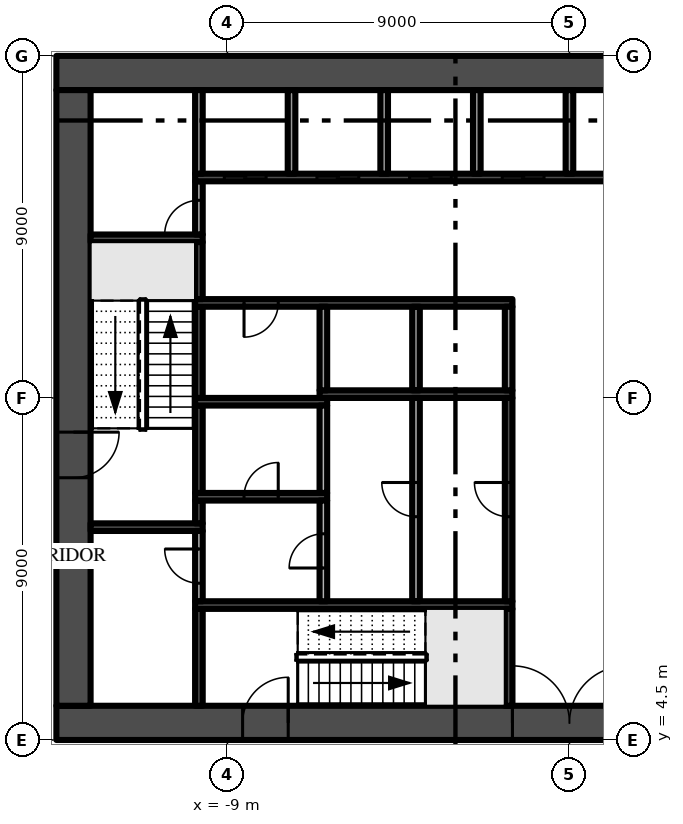
"""IFC4 building model, lengths in metres.
Left out: names, types, materials, properties, quantities, classifications, styles, units other than length and angle.
Written with IfcOpenShell. Run it as: python <this file> out.ifc"""

import sys

from ifc_helpers import new_model, si_unit, direction, frame, frame_2d, origin, place, context, subcontext, project, spatial, rectangle, extrude, element, fill, save


model = new_model("IFC4")
c1 = context("Model", 3, precision=1e-05, world=origin(), true_north=direction((0.0, 1.0)))
c2 = subcontext(c1, "Body", "Model", "MODEL_VIEW")
j1 = project(units=[si_unit("LENGTHUNIT", "METRE"), si_unit("PLANEANGLEUNIT", "RADIAN")], contexts=[c1])
p1 = place(None, origin())
s1 = spatial("IfcSite", under=j1, at=p1, CompositionType="ELEMENT")
p2 = place(p1, origin())
s2 = spatial("IfcBuilding", under=s1, at=p2, CompositionType="ELEMENT")
p3 = place(p2, frame((0.0, 0.0, 6.0)))
s3 = spatial("IfcBuildingStorey", under=s2, at=p3, CompositionType="ELEMENT", Elevation=6.0)
p4 = place(p3, frame((-13.5, 4.95, -0.4), z_axis=(0.0, 0.0, 1.0), x_axis=(1.0, 0.0, 0.0)))
e1 = element("IfcWall", 1, at=p4, inside=s3, PredefinedType="SHEAR", context=c2, shape_type="SweptSolid", body=[
    extrude(rectangle(XDim=27.0, YDim=0.9, at=frame_2d((13.5, 0.0))), origin(), (0.0, 0.0, 1.0), 4.55),
])
p5 = place(p4, frame((12.0, 0.0, 0.4)))
e2 = element("IfcOpeningElement", 2, at=p5, cuts=e1, PredefinedType="OPENING", context=c2, shape_type="SweptSolid", body=[
    extrude(rectangle(XDim=3.0, YDim=2.4, at=frame_2d((1.5, 1.2))), frame((0.0, 0.46, 0.0), z_axis=(0.0, -1.0, 0.0), x_axis=(1.0, 0.0, 0.0)), (0.0, 0.0, 1.0), 0.92),
])
p6 = place(p4, frame((4.9, 0.0, 0.4)))
e3 = element("IfcOpeningElement", 3, at=p6, cuts=e1, PredefinedType="OPENING", context=c2, shape_type="SweptSolid", body=[
    extrude(rectangle(XDim=1.2, YDim=2.2, at=frame_2d((0.6, 1.1))), frame((0.0, 0.46, 0.0), z_axis=(0.0, -1.0, 0.0), x_axis=(1.0, 0.0, 0.0)), (0.0, 0.0, 1.0), 0.92),
])
p7 = place(p4, frame((20.75, 0.0, 0.4)))
e4 = element("IfcOpeningElement", 4, at=p7, cuts=e1, PredefinedType="OPENING", context=c2, shape_type="SweptSolid", body=[
    extrude(rectangle(XDim=1.5, YDim=2.2, at=frame_2d((0.75, 1.1))), frame((0.0, 0.46, 0.0), z_axis=(0.0, -1.0, 0.0), x_axis=(1.0, 0.0, 0.0)), (0.0, 0.0, 1.0), 0.92),
])
p8 = place(p4, frame((17.4, 0.0, 0.4)))
e5 = element("IfcOpeningElement", 5, at=p8, cuts=e1, PredefinedType="OPENING", context=c2, shape_type="SweptSolid", body=[
    extrude(rectangle(XDim=1.2, YDim=2.2, at=frame_2d((0.6, 1.1))), frame((0.0, 0.46, 0.0), z_axis=(0.0, -1.0, 0.0), x_axis=(1.0, 0.0, 0.0)), (0.0, 0.0, 1.0), 0.92),
])
p9 = place(p3, frame((13.5, 22.05, -0.4), z_axis=(0.0, 0.0, 1.0), x_axis=(-1.0, 0.0, 0.0)))
e6 = element("IfcWall", 6, at=p9, inside=s3, PredefinedType="SHEAR", context=c2, shape_type="SweptSolid", body=[
    extrude(rectangle(XDim=27.0, YDim=0.9, at=frame_2d((13.5, 0.0))), origin(), (0.0, 0.0, 1.0), 4.55),
])
p10 = place(p3, frame((-13.05, 21.6, -0.4), z_axis=(0.0, 0.0, 1.0), x_axis=(0.0, -1.0, 0.0)))
e7 = element("IfcWall", 7, at=p10, inside=s3, PredefinedType="SHEAR", context=c2, shape_type="SweptSolid", body=[
    extrude(rectangle(XDim=16.2, YDim=0.9, at=frame_2d((8.1, 0.0))), origin(), (0.0, 0.0, 1.0), 4.55),
])
p11 = place(p10, frame((9.0, 0.0, 0.4)))
e8 = element("IfcOpeningElement", 8, at=p11, cuts=e7, PredefinedType="OPENING", context=c2, shape_type="SweptSolid", body=[
    extrude(rectangle(XDim=1.2, YDim=2.2, at=frame_2d((0.6, 1.1))), frame((0.0, 0.46, 0.0), z_axis=(0.0, -1.0, 0.0), x_axis=(1.0, 0.0, 0.0)), (0.0, 0.0, 1.0), 0.92),
])
for number, where, z_axis, x_axis in (
    (9, (-12.6, 10.1, 0.0), (0.0, 0.0, 1.0), (1.0, 0.0, 0.0)),
    (10, (-12.6, 17.7, 0.0), (0.0, 0.0, 1.0), (1.0, 0.0, 0.0)),
):
    element("IfcWall", number, at=place(p3, frame(where, z_axis=z_axis, x_axis=x_axis)), inside=s3, PredefinedType="SHEAR", context=c2, shape_type="SweptSolid", body=[
        extrude(rectangle(XDim=2.95, YDim=0.2, at=frame_2d((1.475, 0.0))), origin(), (0.0, 0.0, 1.0), 4.15),
    ])
p12 = place(p3, frame((-9.75, 5.4, 0.0), z_axis=(0.0, 0.0, 1.0), x_axis=(0.0, 1.0, 0.0)))
e11 = element("IfcWall", 11, at=p12, inside=s3, PredefinedType="SHEAR", context=c2, shape_type="SweptSolid", body=[
    extrude(rectangle(XDim=2.55, YDim=0.2, at=frame_2d((1.275, 0.0))), origin(), (0.0, 0.0, 1.0), 4.15),
])
p13 = place(p3, frame((-9.85, 8.05, 0.0), z_axis=(0.0, 0.0, 1.0), x_axis=(1.0, 0.0, 0.0)))
e12 = element("IfcWall", 12, at=p13, inside=s3, PredefinedType="SHEAR", context=c2, shape_type="SweptSolid", body=[
    extrude(rectangle(XDim=8.35, YDim=0.2, at=frame_2d((4.175, 0.0))), origin(), (0.0, 0.0, 1.0), 4.15),
])
p14 = place(p3, frame((-9.75, 8.15, 0.0), z_axis=(0.0, 0.0, 1.0), x_axis=(0.0, 1.0, 0.0)))
e13 = element("IfcWall", 13, at=p14, inside=s3, PredefinedType="PARTITIONING", context=c2, shape_type="SweptSolid", body=[
    extrude(rectangle(XDim=1.85, YDim=0.2, at=frame_2d((0.925, 0.0))), origin(), (0.0, 0.0, 1.0), 4.15),
])
p15 = place(p14, frame((0.475, 0.0, 0.0)))
e14 = element("IfcOpeningElement", 14, at=p15, cuts=e13, PredefinedType="OPENING", context=c2, shape_type="SweptSolid", body=[
    extrude(rectangle(XDim=0.9, YDim=2.1, at=frame_2d((0.45, 1.05))), frame((0.0, 0.11, 0.0), z_axis=(0.0, -1.0, 0.0), x_axis=(1.0, 0.0, 0.0)), (0.0, 0.0, 1.0), 0.22),
])
p16 = place(p3, frame((-9.75, 10.2, 0.0), z_axis=(0.0, 0.0, 1.0), x_axis=(0.0, 1.0, 0.0)))
e15 = element("IfcWall", 15, at=p16, inside=s3, PredefinedType="SHEAR", context=c2, shape_type="SweptSolid", body=[
    extrude(rectangle(XDim=0.6, YDim=0.2, at=frame_2d((0.3, 0.0))), origin(), (0.0, 0.0, 1.0), 4.15),
])
p17 = place(p3, frame((-9.85, 10.9, 0.0), z_axis=(0.0, 0.0, 1.0), x_axis=(1.0, 0.0, 0.0)))
e16 = element("IfcWall", 16, at=p17, inside=s3, PredefinedType="SHEAR", context=c2, shape_type="SweptSolid", body=[
    extrude(rectangle(XDim=3.475, YDim=0.2, at=frame_2d((1.738, 0.0))), origin(), (0.0, 0.0, 1.0), 4.15),
])
p18 = place(p17, frame((1.288, 0.0, 0.0)))
e17 = element("IfcOpeningElement", 17, at=p18, cuts=e16, PredefinedType="OPENING", context=c2, shape_type="SweptSolid", body=[
    extrude(rectangle(XDim=0.9, YDim=2.1, at=frame_2d((0.45, 1.05))), frame((0.0, 0.11, 0.0), z_axis=(0.0, -1.0, 0.0), x_axis=(1.0, 0.0, 0.0)), (0.0, 0.0, 1.0), 0.22),
])
p19 = place(p3, frame((-9.75, 11.0, 0.0), z_axis=(0.0, 0.0, 1.0), x_axis=(0.0, 1.0, 0.0)))
e18 = element("IfcWall", 18, at=p19, inside=s3, PredefinedType="SHEAR", context=c2, shape_type="SweptSolid", body=[
    extrude(rectangle(XDim=2.3, YDim=0.2, at=frame_2d((1.15, 0.0))), origin(), (0.0, 0.0, 1.0), 4.15),
])
p20 = place(p3, frame((-9.85, 13.4, 0.0), z_axis=(0.0, 0.0, 1.0), x_axis=(1.0, 0.0, 0.0)))
e19 = element("IfcWall", 19, at=p20, inside=s3, PredefinedType="SHEAR", context=c2, shape_type="SweptSolid", body=[
    extrude(rectangle(XDim=3.475, YDim=0.2, at=frame_2d((1.738, 0.0))), origin(), (0.0, 0.0, 1.0), 4.15),
])
p21 = place(p3, frame((-9.75, 13.5, 0.0), z_axis=(0.0, 0.0, 1.0), x_axis=(0.0, 1.0, 0.0)))
e20 = element("IfcWall", 20, at=p21, inside=s3, PredefinedType="SHEAR", context=c2, shape_type="SweptSolid", body=[
    extrude(rectangle(XDim=2.4, YDim=0.2, at=frame_2d((1.2, 0.0))), origin(), (0.0, 0.0, 1.0), 4.15),
])
p22 = place(p3, frame((-1.5, 16.0, 0.0), z_axis=(0.0, 0.0, 1.0), x_axis=(-1.0, 0.0, 0.0)))
e21 = element("IfcWall", 21, at=p22, inside=s3, PredefinedType="SHEAR", context=c2, shape_type="SweptSolid", body=[
    extrude(rectangle(XDim=8.35, YDim=0.2, at=frame_2d((4.175, 0.0))), origin(), (0.0, 0.0, 1.0), 4.15),
])
p23 = place(p22, frame((6.162, 0.0, 0.0)))
e22 = element("IfcOpeningElement", 22, at=p23, cuts=e21, PredefinedType="OPENING", context=c2, shape_type="SweptSolid", body=[
    extrude(rectangle(XDim=0.9, YDim=2.1, at=frame_2d((0.45, 1.05))), frame((0.0, 0.11, 0.0), z_axis=(0.0, -1.0, 0.0), x_axis=(1.0, 0.0, 0.0)), (0.0, 0.0, 1.0), 0.22),
])
p24 = place(p3, frame((-9.75, 16.1, 0.0), z_axis=(0.0, 0.0, 1.0), x_axis=(0.0, 1.0, 0.0)))
e23 = element("IfcWall", 23, at=p24, inside=s3, PredefinedType="SHEAR", context=c2, shape_type="SweptSolid", body=[
    extrude(rectangle(XDim=1.5, YDim=0.2, at=frame_2d((0.75, 0.0))), origin(), (0.0, 0.0, 1.0), 4.15),
])
p25 = place(p3, frame((-9.75, 17.8, 0.0), z_axis=(0.0, 0.0, 1.0), x_axis=(0.0, 1.0, 0.0)))
e24 = element("IfcWall", 24, at=p25, inside=s3, PredefinedType="PARTITIONING", context=c2, shape_type="SweptSolid", body=[
    extrude(rectangle(XDim=1.4, YDim=0.2, at=frame_2d((0.7, 0.0))), origin(), (0.0, 0.0, 1.0), 4.15),
])
p26 = place(p25, origin())
e25 = element("IfcOpeningElement", 25, at=p26, cuts=e24, PredefinedType="OPENING", context=c2, shape_type="SweptSolid", body=[
    extrude(rectangle(XDim=0.9, YDim=2.1, at=frame_2d((0.45, 1.05))), frame((0.0, 0.11, 0.0), z_axis=(0.0, -1.0, 0.0), x_axis=(1.0, 0.0, 0.0)), (0.0, 0.0, 1.0), 0.22),
])
p27 = place(p3, frame((-9.85, 19.3, 0.0), z_axis=(0.0, 0.0, 1.0), x_axis=(1.0, 0.0, 0.0)))
e26 = element("IfcWall", 26, at=p27, inside=s3, PredefinedType="SHEAR", context=c2, shape_type="SweptSolid", body=[
    extrude(rectangle(XDim=19.7, YDim=0.2, at=frame_2d((9.85, 0.0))), origin(), (0.0, 0.0, 1.0), 4.15),
])
p28 = place(p27, frame((0.769, 0.0, 0.0)))
e27 = element("IfcOpeningElement", 27, at=p28, cuts=e26, PredefinedType="OPENING", context=c2, shape_type="SweptSolid", body=[
    extrude(rectangle(XDim=1.1, YDim=2.1, at=frame_2d((0.55, 1.05))), frame((0.0, 0.11, 0.0), z_axis=(0.0, -1.0, 0.0), x_axis=(1.0, 0.0, 0.0)), (0.0, 0.0, 1.0), 0.22),
])
p29 = place(p27, frame((3.206, 0.0, 0.0)))
e28 = element("IfcOpeningElement", 28, at=p29, cuts=e26, PredefinedType="OPENING", context=c2, shape_type="SweptSolid", body=[
    extrude(rectangle(XDim=1.1, YDim=2.1, at=frame_2d((0.55, 1.05))), frame((0.0, 0.11, 0.0), z_axis=(0.0, -1.0, 0.0), x_axis=(1.0, 0.0, 0.0)), (0.0, 0.0, 1.0), 0.22),
])
p30 = place(p27, frame((5.644, 0.0, 0.0)))
e29 = element("IfcOpeningElement", 29, at=p30, cuts=e26, PredefinedType="OPENING", context=c2, shape_type="SweptSolid", body=[
    extrude(rectangle(XDim=1.1, YDim=2.1, at=frame_2d((0.55, 1.05))), frame((0.0, 0.11, 0.0), z_axis=(0.0, -1.0, 0.0), x_axis=(1.0, 0.0, 0.0)), (0.0, 0.0, 1.0), 0.22),
])
p31 = place(p27, frame((8.081, 0.0, 0.0)))
e30 = element("IfcOpeningElement", 30, at=p31, cuts=e26, PredefinedType="OPENING", context=c2, shape_type="SweptSolid", body=[
    extrude(rectangle(XDim=1.1, YDim=2.1, at=frame_2d((0.55, 1.05))), frame((0.0, 0.11, 0.0), z_axis=(0.0, -1.0, 0.0), x_axis=(1.0, 0.0, 0.0)), (0.0, 0.0, 1.0), 0.22),
])
for number, where, z_axis, x_axis in (
    (31, (-9.75, 19.4, 0.0), (0.0, 0.0, 1.0), (0.0, 1.0, 0.0)),
    (32, (-7.312, 19.4, 0.0), (0.0, 0.0, 1.0), (0.0, 1.0, 0.0)),
):
    element("IfcWall", number, at=place(p3, frame(where, z_axis=z_axis, x_axis=x_axis)), inside=s3, PredefinedType="PARTITIONING", context=c2, shape_type="SweptSolid", body=[
        extrude(rectangle(XDim=2.2, YDim=0.2, at=frame_2d((1.1, 0.0))), origin(), (0.0, 0.0, 1.0), 4.15),
    ])
p32 = place(p3, frame((-6.475, 8.15, 0.0), z_axis=(0.0, 0.0, 1.0), x_axis=(0.0, 1.0, 0.0)))
e33 = element("IfcWall", 33, at=p32, inside=s3, PredefinedType="PARTITIONING", context=c2, shape_type="SweptSolid", body=[
    extrude(rectangle(XDim=2.65, YDim=0.2, at=frame_2d((1.325, 0.0))), origin(), (0.0, 0.0, 1.0), 4.15),
])
p33 = place(p32, frame((0.875, 0.0, 0.0)))
e34 = element("IfcOpeningElement", 34, at=p33, cuts=e33, PredefinedType="OPENING", context=c2, shape_type="SweptSolid", body=[
    extrude(rectangle(XDim=0.9, YDim=2.1, at=frame_2d((0.45, 1.05))), frame((0.0, 0.11, 0.0), z_axis=(0.0, -1.0, 0.0), x_axis=(1.0, 0.0, 0.0)), (0.0, 0.0, 1.0), 0.22),
])
p34 = place(p3, frame((-6.475, 11.0, 0.0), z_axis=(0.0, 0.0, 1.0), x_axis=(0.0, 1.0, 0.0)))
e35 = element("IfcWall", 35, at=p34, inside=s3, PredefinedType="PARTITIONING", context=c2, shape_type="SweptSolid", body=[
    extrude(rectangle(XDim=2.3, YDim=0.2, at=frame_2d((1.15, 0.0))), origin(), (0.0, 0.0, 1.0), 4.15),
])
p35 = place(p3, frame((-6.575, 13.6, 0.0), z_axis=(0.0, 0.0, 1.0), x_axis=(1.0, 0.0, 0.0)))
e36 = element("IfcWall", 36, at=p35, inside=s3, PredefinedType="SHEAR", context=c2, shape_type="SweptSolid", body=[
    extrude(rectangle(XDim=5.075, YDim=0.2, at=frame_2d((2.538, 0.0))), origin(), (0.0, 0.0, 1.0), 4.15),
])
for number, where, z_axis, x_axis in (
    (37, (-6.475, 13.7, 0.0), (0.0, 0.0, 1.0), (0.0, 1.0, 0.0)),
    (38, (-4.875, 19.4, 0.0), (0.0, 0.0, 1.0), (0.0, 1.0, 0.0)),
):
    element("IfcWall", number, at=place(p3, frame(where, z_axis=z_axis, x_axis=x_axis)), inside=s3, PredefinedType="PARTITIONING", context=c2, shape_type="SweptSolid", body=[
        extrude(rectangle(XDim=2.2, YDim=0.2, at=frame_2d((1.1, 0.0))), origin(), (0.0, 0.0, 1.0), 4.15),
    ])
p36 = place(p3, frame((-4.037, 8.15, 0.0), z_axis=(0.0, 0.0, 1.0), x_axis=(0.0, 1.0, 0.0)))
e39 = element("IfcWall", 39, at=p36, inside=s3, PredefinedType="PARTITIONING", context=c2, shape_type="SweptSolid", body=[
    extrude(rectangle(XDim=5.35, YDim=0.2, at=frame_2d((2.675, 0.0))), origin(), (0.0, 0.0, 1.0), 4.15),
])
p37 = place(p36, frame((2.225, 0.0, 0.0)))
e40 = element("IfcOpeningElement", 40, at=p37, cuts=e39, PredefinedType="OPENING", context=c2, shape_type="SweptSolid", body=[
    extrude(rectangle(XDim=0.9, YDim=2.1, at=frame_2d((0.45, 1.05))), frame((0.0, 0.11, 0.0), z_axis=(0.0, -1.0, 0.0), x_axis=(1.0, 0.0, 0.0)), (0.0, 0.0, 1.0), 0.22),
])
for number, where, z_axis, x_axis in (
    (41, (-4.037, 13.7, 0.0), (0.0, 0.0, 1.0), (0.0, 1.0, 0.0)),
    (42, (-2.438, 19.4, 0.0), (0.0, 0.0, 1.0), (0.0, 1.0, 0.0)),
):
    element("IfcWall", number, at=place(p3, frame(where, z_axis=z_axis, x_axis=x_axis)), inside=s3, PredefinedType="PARTITIONING", context=c2, shape_type="SweptSolid", body=[
        extrude(rectangle(XDim=2.2, YDim=0.2, at=frame_2d((1.1, 0.0))), origin(), (0.0, 0.0, 1.0), 4.15),
    ])
p38 = place(p3, frame((-1.6, 5.4, 0.0), z_axis=(0.0, 0.0, 1.0), x_axis=(0.0, 1.0, 0.0)))
e43 = element("IfcWall", 43, at=p38, inside=s3, PredefinedType="SHEAR", context=c2, shape_type="SweptSolid", body=[
    extrude(rectangle(XDim=2.55, YDim=0.2, at=frame_2d((1.275, 0.0))), origin(), (0.0, 0.0, 1.0), 4.15),
])
p39 = place(p3, frame((-1.6, 8.15, 0.0), z_axis=(0.0, 0.0, 1.0), x_axis=(0.0, 1.0, 0.0)))
e44 = element("IfcWall", 44, at=p39, inside=s3, PredefinedType="SHEAR", context=c2, shape_type="SweptSolid", body=[
    extrude(rectangle(XDim=5.35, YDim=0.2, at=frame_2d((2.675, 0.0))), origin(), (0.0, 0.0, 1.0), 4.15),
])
p40 = place(p39, frame((2.225, 0.0, 0.0)))
e45 = element("IfcOpeningElement", 45, at=p40, cuts=e44, PredefinedType="OPENING", context=c2, shape_type="SweptSolid", body=[
    extrude(rectangle(XDim=0.9, YDim=2.1, at=frame_2d((0.45, 1.05))), frame((0.0, 0.11, 0.0), z_axis=(0.0, -1.0, 0.0), x_axis=(1.0, 0.0, 0.0)), (0.0, 0.0, 1.0), 0.22),
])
for number, where, z_axis, x_axis in (
    (46, (-1.6, 13.7, 0.0), (0.0, 0.0, 1.0), (0.0, 1.0, 0.0)),
    (47, (0.0, 19.4, 0.0), (0.0, 0.0, 1.0), (0.0, 1.0, 0.0)),
):
    element("IfcWall", number, at=place(p3, frame(where, z_axis=z_axis, x_axis=x_axis)), inside=s3, PredefinedType="PARTITIONING", context=c2, shape_type="SweptSolid", body=[
        extrude(rectangle(XDim=2.2, YDim=0.2, at=frame_2d((1.1, 0.0))), origin(), (0.0, 0.0, 1.0), 4.15),
    ])
p41 = place(p5, frame((3.0, 0.0, 0.0), z_axis=(0.0, 0.0, 1.0), x_axis=(-1.0, 0.0, 0.0)))
e48 = element("IfcDoor", 48, at=p41, inside=s3, OperationType="DOUBLE_DOOR_SINGLE_SWING", PredefinedType="DOOR", context=c2, shape_type="SweptSolid", body=[
    extrude(rectangle(XDim=3.0, YDim=2.4, at=frame_2d((1.5, 1.2))), frame((0.0, 0.025, 0.0), z_axis=(0.0, -1.0, 0.0), x_axis=(1.0, 0.0, 0.0)), (0.0, 0.0, 1.0), 0.05),
])
fill(e2, e48)
p42 = place(p11, frame((1.2, 0.0, 0.0), z_axis=(0.0, 0.0, 1.0), x_axis=(-1.0, 0.0, 0.0)))
e49 = element("IfcDoor", 49, at=p42, inside=s3, OperationType="SINGLE_SWING_RIGHT", PredefinedType="DOOR", context=c2, shape_type="SweptSolid", body=[
    extrude(rectangle(XDim=1.2, YDim=2.2, at=frame_2d((0.6, 1.1))), frame((0.0, 0.025, 0.0), z_axis=(0.0, -1.0, 0.0), x_axis=(1.0, 0.0, 0.0)), (0.0, 0.0, 1.0), 0.05),
])
fill(e8, e49)
p43 = place(p6, frame((1.2, 0.0, 0.0), z_axis=(0.0, 0.0, 1.0), x_axis=(-1.0, 0.0, 0.0)))
e50 = element("IfcDoor", 50, at=p43, inside=s3, OperationType="SINGLE_SWING_LEFT", PredefinedType="DOOR", context=c2, shape_type="SweptSolid", body=[
    extrude(rectangle(XDim=1.2, YDim=2.2, at=frame_2d((0.6, 1.1))), frame((0.0, 0.025, 0.0), z_axis=(0.0, -1.0, 0.0), x_axis=(1.0, 0.0, 0.0)), (0.0, 0.0, 1.0), 0.05),
])
fill(e3, e50)
p44 = place(p28, origin())
e51 = element("IfcDoor", 51, at=p44, inside=s3, OperationType="SLIDING_TO_LEFT", PredefinedType="DOOR", context=c2, shape_type="SweptSolid", body=[
    extrude(rectangle(XDim=1.1, YDim=2.1, at=frame_2d((0.55, 1.05))), frame((0.0, 0.025, 0.0), z_axis=(0.0, -1.0, 0.0), x_axis=(1.0, 0.0, 0.0)), (0.0, 0.0, 1.0), 0.05),
])
fill(e27, e51)
p45 = place(p29, origin())
e52 = element("IfcDoor", 52, at=p45, inside=s3, OperationType="SLIDING_TO_LEFT", PredefinedType="DOOR", context=c2, shape_type="SweptSolid", body=[
    extrude(rectangle(XDim=1.1, YDim=2.1, at=frame_2d((0.55, 1.05))), frame((0.0, 0.025, 0.0), z_axis=(0.0, -1.0, 0.0), x_axis=(1.0, 0.0, 0.0)), (0.0, 0.0, 1.0), 0.05),
])
fill(e28, e52)
p46 = place(p30, origin())
e53 = element("IfcDoor", 53, at=p46, inside=s3, OperationType="SLIDING_TO_LEFT", PredefinedType="DOOR", context=c2, shape_type="SweptSolid", body=[
    extrude(rectangle(XDim=1.1, YDim=2.1, at=frame_2d((0.55, 1.05))), frame((0.0, 0.025, 0.0), z_axis=(0.0, -1.0, 0.0), x_axis=(1.0, 0.0, 0.0)), (0.0, 0.0, 1.0), 0.05),
])
fill(e29, e53)
p47 = place(p31, origin())
e54 = element("IfcDoor", 54, at=p47, inside=s3, OperationType="SLIDING_TO_LEFT", PredefinedType="DOOR", context=c2, shape_type="SweptSolid", body=[
    extrude(rectangle(XDim=1.1, YDim=2.1, at=frame_2d((0.55, 1.05))), frame((0.0, 0.025, 0.0), z_axis=(0.0, -1.0, 0.0), x_axis=(1.0, 0.0, 0.0)), (0.0, 0.0, 1.0), 0.05),
])
fill(e30, e54)
p48 = place(p23, origin())
e55 = element("IfcDoor", 55, at=p48, inside=s3, OperationType="SINGLE_SWING_RIGHT", PredefinedType="DOOR", context=c2, shape_type="SweptSolid", body=[
    extrude(rectangle(XDim=0.9, YDim=2.1, at=frame_2d((0.45, 1.05))), frame((0.0, 0.025, 0.0), z_axis=(0.0, -1.0, 0.0), x_axis=(1.0, 0.0, 0.0)), (0.0, 0.0, 1.0), 0.05),
])
fill(e22, e55)
p49 = place(p40, origin())
e56 = element("IfcDoor", 56, at=p49, inside=s3, OperationType="SINGLE_SWING_RIGHT", PredefinedType="DOOR", context=c2, shape_type="SweptSolid", body=[
    extrude(rectangle(XDim=0.9, YDim=2.1, at=frame_2d((0.45, 1.05))), frame((0.0, 0.025, 0.0), z_axis=(0.0, -1.0, 0.0), x_axis=(1.0, 0.0, 0.0)), (0.0, 0.0, 1.0), 0.05),
])
fill(e45, e56)
p50 = place(p26, origin())
e57 = element("IfcDoor", 57, at=p50, inside=s3, OperationType="SINGLE_SWING_LEFT", PredefinedType="DOOR", context=c2, shape_type="SweptSolid", body=[
    extrude(rectangle(XDim=0.9, YDim=2.1, at=frame_2d((0.45, 1.05))), frame((0.0, 0.025, 0.0), z_axis=(0.0, -1.0, 0.0), x_axis=(1.0, 0.0, 0.0)), (0.0, 0.0, 1.0), 0.05),
])
fill(e25, e57)
p51 = place(p37, origin())
e58 = element("IfcDoor", 58, at=p51, inside=s3, OperationType="SINGLE_SWING_RIGHT", PredefinedType="DOOR", context=c2, shape_type="SweptSolid", body=[
    extrude(rectangle(XDim=0.9, YDim=2.1, at=frame_2d((0.45, 1.05))), frame((0.0, 0.025, 0.0), z_axis=(0.0, -1.0, 0.0), x_axis=(1.0, 0.0, 0.0)), (0.0, 0.0, 1.0), 0.05),
])
fill(e40, e58)
p52 = place(p33, origin())
e59 = element("IfcDoor", 59, at=p52, inside=s3, OperationType="SINGLE_SWING_LEFT", PredefinedType="DOOR", context=c2, shape_type="SweptSolid", body=[
    extrude(rectangle(XDim=0.9, YDim=2.1, at=frame_2d((0.45, 1.05))), frame((0.0, 0.025, 0.0), z_axis=(0.0, -1.0, 0.0), x_axis=(1.0, 0.0, 0.0)), (0.0, 0.0, 1.0), 0.05),
])
fill(e34, e59)
p53 = place(p18, origin())
e60 = element("IfcDoor", 60, at=p53, inside=s3, OperationType="SINGLE_SWING_RIGHT", PredefinedType="DOOR", context=c2, shape_type="SweptSolid", body=[
    extrude(rectangle(XDim=0.9, YDim=2.1, at=frame_2d((0.45, 1.05))), frame((0.0, 0.025, 0.0), z_axis=(0.0, -1.0, 0.0), x_axis=(1.0, 0.0, 0.0)), (0.0, 0.0, 1.0), 0.05),
])
fill(e17, e60)
p54 = place(p15, origin())
e61 = element("IfcDoor", 61, at=p54, inside=s3, OperationType="SINGLE_SWING_RIGHT", PredefinedType="DOOR", context=c2, shape_type="SweptSolid", body=[
    extrude(rectangle(XDim=0.9, YDim=2.1, at=frame_2d((0.45, 1.05))), frame((0.0, 0.025, 0.0), z_axis=(0.0, -1.0, 0.0), x_axis=(1.0, 0.0, 0.0)), (0.0, 0.0, 1.0), 0.05),
])
fill(e14, e61)
save(model, sys.argv[1])
